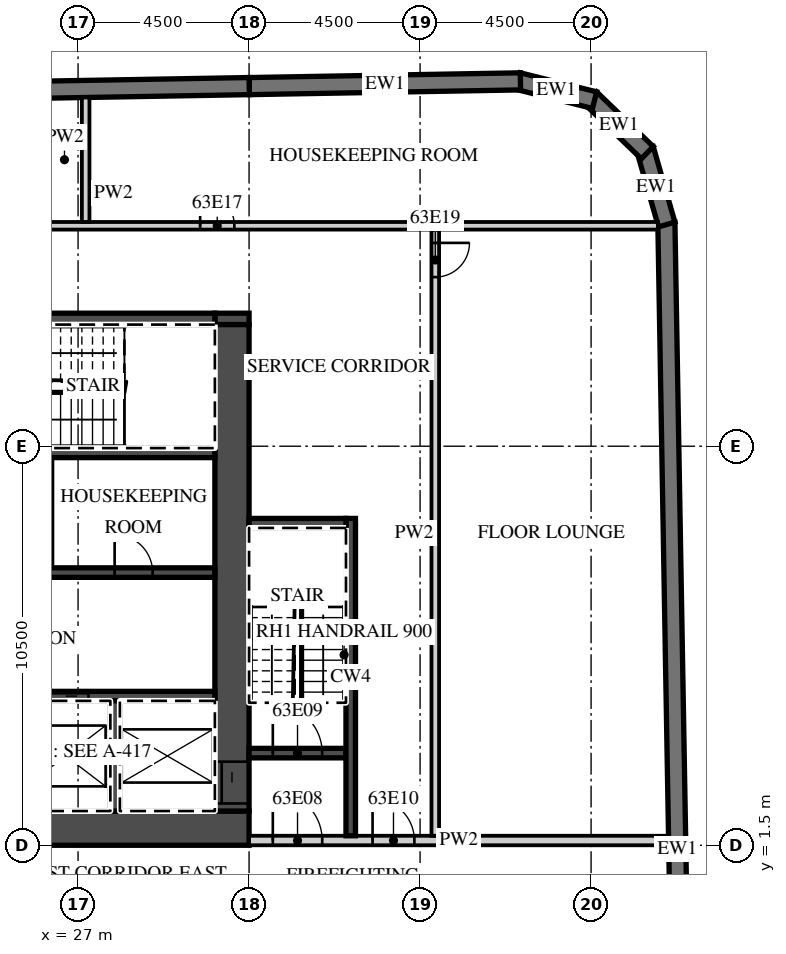
"""IFC4 building model, lengths in metres.
Left out: names, types, materials, properties, quantities, classifications, styles, units other than length and angle.
Written with IfcOpenShell. Run it as: python <this file> out.ifc"""

import sys

from ifc_helpers import new_model, si_unit, direction, frame, frame_2d, origin, place, context, subcontext, project, spatial, polyline, rectangle, outline, extrude, element, fill, save


model = new_model("IFC4")
c1 = context("Model", 3, precision=1e-05, world=origin(), true_north=direction((0.0, 1.0)))
c2 = subcontext(c1, "Body", "Model", "MODEL_VIEW")
j1 = project(units=[si_unit("LENGTHUNIT", "METRE"), si_unit("PLANEANGLEUNIT", "RADIAN")], contexts=[c1])
p1 = place(None, origin())
s1 = spatial("IfcSite", under=j1, at=p1, CompositionType="ELEMENT")
p2 = place(p1, origin())
s2 = spatial("IfcBuilding", under=s1, at=p2, CompositionType="ELEMENT")
p3 = place(p2, frame((0.0, 0.0, 254.0)))
s3 = spatial("IfcBuildingStorey", under=s2, at=p3, CompositionType="ELEMENT", Elevation=254.0)
p4 = place(p3, frame((43.057, -15.103, 0.0), z_axis=(0.0, 0.0, 1.0), x_axis=(-0.017452408953, 0.999847695112, 0.0)))
e1 = element("IfcWall", 1, at=p4, inside=s3, PredefinedType="SOLIDWALL", context=c2, shape_type="SweptSolid", body=[
    extrude(rectangle(XDim=33.0, YDim=0.45, at=frame_2d((16.5, 0.0))), origin(), (0.0, 0.0, 1.0), 3.0),
])
p5 = place(p3, frame((42.49, 17.833, 0.0), z_axis=(0.0, 0.0, 1.0), x_axis=(-0.275546368831, 0.961287781377, 0.0)))
e2 = element("IfcWall", 2, at=p5, inside=s3, PredefinedType="SOLIDWALL", context=c2, shape_type="SweptSolid", body=[
    extrude(outline(polyline([(0.0, -0.225), (2.071, -0.225), (1.95, 0.225), (0.121, 0.225), (0.0, -0.225)])), origin(), (0.0, 0.0, 1.0), 3.0),
])
p6 = place(p3, frame((41.979, 19.724, 0.0), z_axis=(0.0, 0.0, 1.0), x_axis=(-0.719379111448, 0.694617660308, 0.0)))
e3 = element("IfcWall", 3, at=p6, inside=s3, PredefinedType="SOLIDWALL", context=c2, shape_type="SweptSolid", body=[
    extrude(outline(polyline([(0.0, -0.225), (2.071, -0.225), (1.95, 0.225), (0.121, 0.225), (0.0, -0.225)])), origin(), (0.0, 0.0, 1.0), 3.0),
])
p7 = place(p3, frame((40.591, 21.106, 0.0), z_axis=(0.0, 0.0, 1.0), x_axis=(-0.970287979719, 0.241952963225, 0.0)))
e4 = element("IfcWall", 4, at=p7, inside=s3, PredefinedType="SOLIDWALL", context=c2, shape_type="SweptSolid", body=[
    extrude(outline(polyline([(0.0, -0.225), (2.071, -0.225), (1.95, 0.225), (0.121, 0.225), (0.0, -0.225)])), origin(), (0.0, 0.0, 1.0), 3.0),
])
p8 = place(p3, frame((38.641, 21.6, 0.0), z_axis=(0.0, 0.0, 1.0), x_axis=(-0.999847245074, -0.017478172627, 0.0)))
e5 = element("IfcWall", 5, at=p8, inside=s3, PredefinedType="SOLIDWALL", context=c2, shape_type="SweptSolid", body=[
    extrude(rectangle(XDim=7.138, YDim=0.45, at=frame_2d((3.569, 0.0))), origin(), (0.0, 0.0, 1.0), 3.0),
])
p9 = place(p3, frame((31.504, 21.476, 0.0), z_axis=(0.0, 0.0, 1.0), x_axis=(-0.999847677887, -0.017453395744, 0.0)))
e6 = element("IfcWall", 6, at=p9, inside=s3, PredefinedType="SOLIDWALL", context=c2, shape_type="SweptSolid", body=[
    extrude(rectangle(XDim=18.003, YDim=0.45, at=frame_2d((9.001, 0.0))), origin(), (0.0, 0.0, 1.0), 3.0),
])
p10 = place(p3, frame((13.5, 1.95, 0.0), z_axis=(0.0, 0.0, 1.0), x_axis=(1.0, 0.0, 0.0)))
e7 = element("IfcWall", 7, at=p10, inside=s3, PredefinedType="SHEAR", context=c2, shape_type="SweptSolid", body=[
    extrude(rectangle(XDim=18.0, YDim=0.9, at=frame_2d((9.0, 0.0))), origin(), (0.0, 0.0, 1.0), 3.0),
])
p11 = place(p10, frame((1.475, 0.0, 0.0)))
e8 = element("IfcOpeningElement", 8, at=p11, cuts=e7, PredefinedType="OPENING", context=c2, shape_type="SweptSolid", body=[
    extrude(rectangle(XDim=1.8, YDim=2.1, at=frame_2d((0.9, 1.05))), frame((0.0, 0.46, 0.0), z_axis=(0.0, -1.0, 0.0), x_axis=(1.0, 0.0, 0.0)), (0.0, 0.0, 1.0), 0.92),
])
p12 = place(p3, frame((30.6, 15.35, 0.0), z_axis=(0.0, 0.0, 1.0), x_axis=(1.0, 0.0, 0.0)))
e9 = element("IfcWall", 9, at=p12, inside=s3, PredefinedType="SHEAR", context=c2, shape_type="SweptSolid", body=[
    extrude(rectangle(XDim=0.9, YDim=0.3, at=frame_2d((0.45, 0.0))), origin(), (0.0, 0.0, 1.0), 3.0),
])
p13 = place(p3, frame((20.3, 15.35, 0.0), z_axis=(0.0, 0.0, 1.0), x_axis=(1.0, 0.0, 0.0)))
e10 = element("IfcWall", 10, at=p13, inside=s3, PredefinedType="SHEAR", context=c2, shape_type="SweptSolid", body=[
    extrude(rectangle(XDim=10.3, YDim=0.3, at=frame_2d((5.15, 0.0))), origin(), (0.0, 0.0, 1.0), 3.0),
])
p14 = place(p13, frame((4.0, 0.0, 0.0)))
e11 = element("IfcOpeningElement", 11, at=p14, cuts=e10, PredefinedType="OPENING", context=c2, shape_type="SweptSolid", body=[
    extrude(rectangle(XDim=1.3, YDim=2.1, at=frame_2d((0.65, 1.05))), frame((0.0, 0.16, 0.0), z_axis=(0.0, -1.0, 0.0), x_axis=(1.0, 0.0, 0.0)), (0.0, 0.0, 1.0), 0.32),
])
p15 = place(p13, frame((2.562, 0.0, 0.0)))
e12 = element("IfcOpeningElement", 12, at=p15, cuts=e10, PredefinedType="OPENING", context=c2, shape_type="SweptSolid", body=[
    extrude(rectangle(XDim=0.9, YDim=2.1, at=frame_2d((0.45, 1.05))), frame((0.0, 0.16, 0.0), z_axis=(0.0, -1.0, 0.0), x_axis=(1.0, 0.0, 0.0)), (0.0, 0.0, 1.0), 0.32),
])
p16 = place(p13, frame((0.738, 0.0, 0.0)))
e13 = element("IfcOpeningElement", 13, at=p16, cuts=e10, PredefinedType="OPENING", context=c2, shape_type="SweptSolid", body=[
    extrude(rectangle(XDim=0.9, YDim=2.1, at=frame_2d((0.45, 1.05))), frame((0.0, 0.16, 0.0), z_axis=(0.0, -1.0, 0.0), x_axis=(1.0, 0.0, 0.0)), (0.0, 0.0, 1.0), 0.32),
])
p17 = place(p3, frame((31.05, 2.4, 0.0), z_axis=(0.0, 0.0, 1.0), x_axis=(0.0, 1.0, 0.0)))
e14 = element("IfcWall", 14, at=p17, inside=s3, PredefinedType="SHEAR", context=c2, shape_type="SweptSolid", body=[
    extrude(rectangle(XDim=12.8, YDim=0.9, at=frame_2d((6.4, 0.0))), origin(), (0.0, 0.0, 1.0), 3.0),
])
p18 = place(p17, frame((0.2, 0.0, 0.0)))
e15 = element("IfcOpeningElement", 15, at=p18, cuts=e14, PredefinedType="OPENING", context=c2, shape_type="SweptSolid", body=[
    extrude(rectangle(XDim=1.1, YDim=2.1, at=frame_2d((0.55, 1.05))), frame((0.0, 0.46, 0.0), z_axis=(0.0, -1.0, 0.0), x_axis=(1.0, 0.0, 0.0)), (0.0, 0.0, 1.0), 0.92),
])
p19 = place(p3, frame((17.6, 5.425, 0.0), z_axis=(0.0, 0.0, 1.0), x_axis=(1.0, 0.0, 0.0)))
e16 = element("IfcWall", 16, at=p19, inside=s3, PredefinedType="SHEAR", context=c2, shape_type="SweptSolid", body=[
    extrude(rectangle(XDim=13.0, YDim=0.25, at=frame_2d((6.5, 0.0))), origin(), (0.0, 0.0, 1.0), 3.0),
])
p20 = place(p19, frame((8.475, 0.0, 0.0)))
e17 = element("IfcOpeningElement", 17, at=p20, cuts=e16, PredefinedType="OPENING", context=c2, shape_type="SweptSolid", body=[
    extrude(rectangle(XDim=1.2, YDim=2.1, at=frame_2d((0.6, 1.05))), frame((0.0, 0.135, 0.0), z_axis=(0.0, -1.0, 0.0), x_axis=(1.0, 0.0, 0.0)), (0.0, 0.0, 1.0), 0.27),
])
p21 = place(p19, frame((5.875, 0.0, 0.0)))
e18 = element("IfcOpeningElement", 18, at=p21, cuts=e16, PredefinedType="OPENING", context=c2, shape_type="SweptSolid", body=[
    extrude(rectangle(XDim=1.2, YDim=2.1, at=frame_2d((0.6, 1.05))), frame((0.0, 0.135, 0.0), z_axis=(0.0, -1.0, 0.0), x_axis=(1.0, 0.0, 0.0)), (0.0, 0.0, 1.0), 0.27),
])
p22 = place(p3, frame((27.975, 2.4, 0.0), z_axis=(0.0, 0.0, 1.0), x_axis=(0.0, 1.0, 0.0)))
e19 = element("IfcWall", 19, at=p22, inside=s3, PredefinedType="SHEAR", context=c2, shape_type="SweptSolid", body=[
    extrude(rectangle(XDim=2.9, YDim=0.25, at=frame_2d((1.45, 0.0))), origin(), (0.0, 0.0, 1.0), 3.0),
])
p23 = place(p3, frame((14.4, 8.675, 0.0), z_axis=(0.0, 0.0, 1.0), x_axis=(1.0, 0.0, 0.0)))
e20 = element("IfcWall", 20, at=p23, inside=s3, PredefinedType="SHEAR", context=c2, shape_type="SweptSolid", body=[
    extrude(rectangle(XDim=16.2, YDim=0.25, at=frame_2d((8.1, 0.0))), origin(), (0.0, 0.0, 1.0), 3.0),
])
p24 = place(p23, frame((6.45, 0.0, 0.0)))
e21 = element("IfcOpeningElement", 21, at=p24, cuts=e20, PredefinedType="OPENING", context=c2, shape_type="SweptSolid", body=[
    extrude(rectangle(XDim=1.2, YDim=2.1, at=frame_2d((0.6, 1.05))), frame((0.0, 0.135, 0.0), z_axis=(0.0, -1.0, 0.0), x_axis=(1.0, 0.0, 0.0)), (0.0, 0.0, 1.0), 0.27),
])
p25 = place(p23, frame((3.8, 0.0, 0.0)))
e22 = element("IfcOpeningElement", 22, at=p25, cuts=e20, PredefinedType="OPENING", context=c2, shape_type="SweptSolid", body=[
    extrude(rectangle(XDim=1.2, YDim=2.1, at=frame_2d((0.6, 1.05))), frame((0.0, 0.135, 0.0), z_axis=(0.0, -1.0, 0.0), x_axis=(1.0, 0.0, 0.0)), (0.0, 0.0, 1.0), 0.27),
])
p26 = place(p23, frame((0.65, 0.0, 0.0)))
e23 = element("IfcOpeningElement", 23, at=p26, cuts=e20, PredefinedType="OPENING", context=c2, shape_type="SweptSolid", body=[
    extrude(rectangle(XDim=1.3, YDim=2.1, at=frame_2d((0.65, 1.05))), frame((0.0, 0.135, 0.0), z_axis=(0.0, -1.0, 0.0), x_axis=(1.0, 0.0, 0.0)), (0.0, 0.0, 1.0), 0.27),
])
p27 = place(p23, frame((13.562, 0.0, 0.0)))
e24 = element("IfcOpeningElement", 24, at=p27, cuts=e20, PredefinedType="OPENING", context=c2, shape_type="SweptSolid", body=[
    extrude(rectangle(XDim=1.0, YDim=2.1, at=frame_2d((0.5, 1.05))), frame((0.0, 0.135, 0.0), z_axis=(0.0, -1.0, 0.0), x_axis=(1.0, 0.0, 0.0)), (0.0, 0.0, 1.0), 0.27),
])
p28 = place(p23, frame((9.587, 0.0, 0.0)))
e25 = element("IfcOpeningElement", 25, at=p28, cuts=e20, PredefinedType="OPENING", context=c2, shape_type="SweptSolid", body=[
    extrude(rectangle(XDim=1.0, YDim=2.1, at=frame_2d((0.5, 1.05))), frame((0.0, 0.135, 0.0), z_axis=(0.0, -1.0, 0.0), x_axis=(1.0, 0.0, 0.0)), (0.0, 0.0, 1.0), 0.27),
])
p29 = place(p3, frame((17.35, 11.825, 0.0), z_axis=(0.0, 0.0, 1.0), x_axis=(1.0, 0.0, 0.0)))
e26 = element("IfcWall", 26, at=p29, inside=s3, PredefinedType="SHEAR", context=c2, shape_type="SweptSolid", body=[
    extrude(rectangle(XDim=13.25, YDim=0.25, at=frame_2d((6.625, 0.0))), origin(), (0.0, 0.0, 1.0), 3.0),
])
p30 = place(p3, frame((31.5, 1.625, 0.0), z_axis=(0.0, 0.0, 1.0), x_axis=(1.0, 0.0, 0.0)))
e27 = element("IfcWall", 27, at=p30, inside=s3, PredefinedType="PARTITIONING", context=c2, shape_type="SweptSolid", body=[
    extrude(rectangle(XDim=11.04, YDim=0.25, at=frame_2d((5.52, 0.0))), origin(), (0.0, 0.0, 1.0), 3.0),
])
p31 = place(p30, frame((0.625, 0.0, 0.0)))
e28 = element("IfcOpeningElement", 28, at=p31, cuts=e27, PredefinedType="OPENING", context=c2, shape_type="SweptSolid", body=[
    extrude(rectangle(XDim=1.3, YDim=2.1, at=frame_2d((0.65, 1.05))), frame((0.0, 0.135, 0.0), z_axis=(0.0, -1.0, 0.0), x_axis=(1.0, 0.0, 0.0)), (0.0, 0.0, 1.0), 0.27),
])
p32 = place(p30, frame((3.25, 0.0, 0.0)))
e29 = element("IfcOpeningElement", 29, at=p32, cuts=e27, PredefinedType="OPENING", context=c2, shape_type="SweptSolid", body=[
    extrude(rectangle(XDim=1.1, YDim=2.1, at=frame_2d((0.55, 1.05))), frame((0.0, 0.135, 0.0), z_axis=(0.0, -1.0, 0.0), x_axis=(1.0, 0.0, 0.0)), (0.0, 0.0, 1.0), 0.27),
])
p33 = place(p3, frame((31.5, 3.925, 0.0), z_axis=(0.0, 0.0, 1.0), x_axis=(1.0, 0.0, 0.0)))
e30 = element("IfcWall", 30, at=p33, inside=s3, PredefinedType="SHEAR", context=c2, shape_type="SweptSolid", body=[
    extrude(rectangle(XDim=2.55, YDim=0.25, at=frame_2d((1.275, 0.0))), origin(), (0.0, 0.0, 1.0), 3.0),
])
p34 = place(p33, frame((0.625, 0.0, 0.0)))
e31 = element("IfcOpeningElement", 31, at=p34, cuts=e30, PredefinedType="OPENING", context=c2, shape_type="SweptSolid", body=[
    extrude(rectangle(XDim=1.3, YDim=2.1, at=frame_2d((0.65, 1.05))), frame((0.0, 0.135, 0.0), z_axis=(0.0, -1.0, 0.0), x_axis=(1.0, 0.0, 0.0)), (0.0, 0.0, 1.0), 0.27),
])
p35 = place(p3, frame((34.175, 1.75, 0.0), z_axis=(0.0, 0.0, 1.0), x_axis=(0.0, 1.0, 0.0)))
e32 = element("IfcWall", 32, at=p35, inside=s3, PredefinedType="SHEAR", context=c2, shape_type="SweptSolid", body=[
    extrude(rectangle(XDim=8.35, YDim=0.25, at=frame_2d((4.175, 0.0))), origin(), (0.0, 0.0, 1.0), 3.0),
])
p36 = place(p3, frame((31.5, 9.975, 0.0), z_axis=(0.0, 0.0, 1.0), x_axis=(1.0, 0.0, 0.0)))
e33 = element("IfcWall", 33, at=p36, inside=s3, PredefinedType="SHEAR", context=c2, shape_type="SweptSolid", body=[
    extrude(rectangle(XDim=2.55, YDim=0.25, at=frame_2d((1.275, 0.0))), origin(), (0.0, 0.0, 1.0), 3.0),
])
p37 = place(p3, frame((36.4, 1.75, 0.0), z_axis=(0.0, 0.0, 1.0), x_axis=(0.0, 1.0, 0.0)))
e34 = element("IfcWall", 34, at=p37, inside=s3, PredefinedType="PARTITIONING", context=c2, shape_type="SweptSolid", body=[
    extrude(rectangle(XDim=15.95, YDim=0.2, at=frame_2d((7.975, 0.0))), origin(), (0.0, 0.0, 1.0), 3.0),
])
p38 = place(p37, frame((14.7, 0.0, 0.0)))
e35 = element("IfcOpeningElement", 35, at=p38, cuts=e34, PredefinedType="OPENING", context=c2, shape_type="SweptSolid", body=[
    extrude(rectangle(XDim=0.9, YDim=2.1, at=frame_2d((0.45, 1.05))), frame((0.0, 0.11, 0.0), z_axis=(0.0, -1.0, 0.0), x_axis=(1.0, 0.0, 0.0)), (0.0, 0.0, 1.0), 0.22),
])
p39 = place(p3, frame((13.6, 17.8, 0.0), z_axis=(0.0, 0.0, 1.0), x_axis=(1.0, 0.0, 0.0)))
e36 = element("IfcWall", 36, at=p39, inside=s3, PredefinedType="PARTITIONING", context=c2, shape_type="SweptSolid", body=[
    extrude(rectangle(XDim=28.657, YDim=0.2, at=frame_2d((14.329, 0.0))), origin(), (0.0, 0.0, 1.0), 3.0),
])
p40 = place(p39, frame((16.613, 0.0, 0.0)))
e37 = element("IfcOpeningElement", 37, at=p40, cuts=e36, PredefinedType="OPENING", context=c2, shape_type="SweptSolid", body=[
    extrude(rectangle(XDim=0.9, YDim=2.1, at=frame_2d((0.45, 1.05))), frame((0.0, 0.11, 0.0), z_axis=(0.0, -1.0, 0.0), x_axis=(1.0, 0.0, 0.0)), (0.0, 0.0, 1.0), 0.22),
])
p41 = place(p39, frame((8.312, 0.0, 0.0)))
e38 = element("IfcOpeningElement", 38, at=p41, cuts=e36, PredefinedType="OPENING", context=c2, shape_type="SweptSolid", body=[
    extrude(rectangle(XDim=0.9, YDim=2.1, at=frame_2d((0.45, 1.05))), frame((0.0, 0.11, 0.0), z_axis=(0.0, -1.0, 0.0), x_axis=(1.0, 0.0, 0.0)), (0.0, 0.0, 1.0), 0.22),
])
p42 = place(p3, frame((27.2, 17.9, 0.0), z_axis=(0.0, 0.0, 1.0), x_axis=(0.0, 1.0, 0.0)))
e39 = element("IfcWall", 39, at=p42, inside=s3, PredefinedType="PARTITIONING", context=c2, shape_type="SweptSolid", body=[
    extrude(rectangle(XDim=3.276, YDim=0.2, at=frame_2d((1.638, 0.0))), origin(), (0.0, 0.0, 1.0), 3.0),
])
p43 = place(p20, origin())
e40 = element("IfcDoor", 40, at=p43, inside=s3, OperationType="SLIDING_TO_LEFT", PredefinedType="DOOR", context=c2, shape_type="SweptSolid", body=[
    extrude(rectangle(XDim=1.2, YDim=2.1, at=frame_2d((0.6, 1.05))), frame((0.0, 0.025, 0.0), z_axis=(0.0, -1.0, 0.0), x_axis=(1.0, 0.0, 0.0)), (0.0, 0.0, 1.0), 0.05),
])
fill(e17, e40)
p44 = place(p18, origin())
e41 = element("IfcDoor", 41, at=p44, inside=s3, OperationType="SLIDING_TO_LEFT", PredefinedType="DOOR", context=c2, shape_type="SweptSolid", body=[
    extrude(rectangle(XDim=1.1, YDim=2.1, at=frame_2d((0.55, 1.05))), frame((0.0, 0.025, 0.0), z_axis=(0.0, -1.0, 0.0), x_axis=(1.0, 0.0, 0.0)), (0.0, 0.0, 1.0), 0.05),
])
fill(e15, e41)
p45 = place(p31, origin())
e42 = element("IfcDoor", 42, at=p45, inside=s3, OperationType="SINGLE_SWING_LEFT", PredefinedType="DOOR", context=c2, shape_type="SweptSolid", body=[
    extrude(rectangle(XDim=1.3, YDim=2.1, at=frame_2d((0.65, 1.05))), frame((0.0, 0.025, 0.0), z_axis=(0.0, -1.0, 0.0), x_axis=(1.0, 0.0, 0.0)), (0.0, 0.0, 1.0), 0.05),
])
fill(e28, e42)
p46 = place(p34, origin())
e43 = element("IfcDoor", 43, at=p46, inside=s3, OperationType="SINGLE_SWING_LEFT", PredefinedType="DOOR", context=c2, shape_type="SweptSolid", body=[
    extrude(rectangle(XDim=1.3, YDim=2.1, at=frame_2d((0.65, 1.05))), frame((0.0, 0.025, 0.0), z_axis=(0.0, -1.0, 0.0), x_axis=(1.0, 0.0, 0.0)), (0.0, 0.0, 1.0), 0.05),
])
fill(e31, e43)
p47 = place(p32, origin())
e44 = element("IfcDoor", 44, at=p47, inside=s3, OperationType="SINGLE_SWING_LEFT", PredefinedType="DOOR", context=c2, shape_type="SweptSolid", body=[
    extrude(rectangle(XDim=1.1, YDim=2.1, at=frame_2d((0.55, 1.05))), frame((0.0, 0.025, 0.0), z_axis=(0.0, -1.0, 0.0), x_axis=(1.0, 0.0, 0.0)), (0.0, 0.0, 1.0), 0.05),
])
fill(e29, e44)
p48 = place(p27, origin())
e45 = element("IfcDoor", 45, at=p48, inside=s3, OperationType="SINGLE_SWING_LEFT", PredefinedType="DOOR", context=c2, shape_type="SweptSolid", body=[
    extrude(rectangle(XDim=1.0, YDim=2.1, at=frame_2d((0.5, 1.05))), frame((0.0, 0.025, 0.0), z_axis=(0.0, -1.0, 0.0), x_axis=(1.0, 0.0, 0.0)), (0.0, 0.0, 1.0), 0.05),
])
fill(e24, e45)
p49 = place(p40, origin())
e46 = element("IfcDoor", 46, at=p49, inside=s3, OperationType="SINGLE_SWING_LEFT", PredefinedType="DOOR", context=c2, shape_type="SweptSolid", body=[
    extrude(rectangle(XDim=0.9, YDim=2.1, at=frame_2d((0.45, 1.05))), frame((0.0, 0.025, 0.0), z_axis=(0.0, -1.0, 0.0), x_axis=(1.0, 0.0, 0.0)), (0.0, 0.0, 1.0), 0.05),
])
fill(e37, e46)
p50 = place(p38, origin())
e47 = element("IfcDoor", 47, at=p50, inside=s3, OperationType="SINGLE_SWING_RIGHT", PredefinedType="DOOR", context=c2, shape_type="SweptSolid", body=[
    extrude(rectangle(XDim=0.9, YDim=2.1, at=frame_2d((0.45, 1.05))), frame((0.0, 0.025, 0.0), z_axis=(0.0, -1.0, 0.0), x_axis=(1.0, 0.0, 0.0)), (0.0, 0.0, 1.0), 0.05),
])
fill(e35, e47)
save(model, sys.argv[1])
